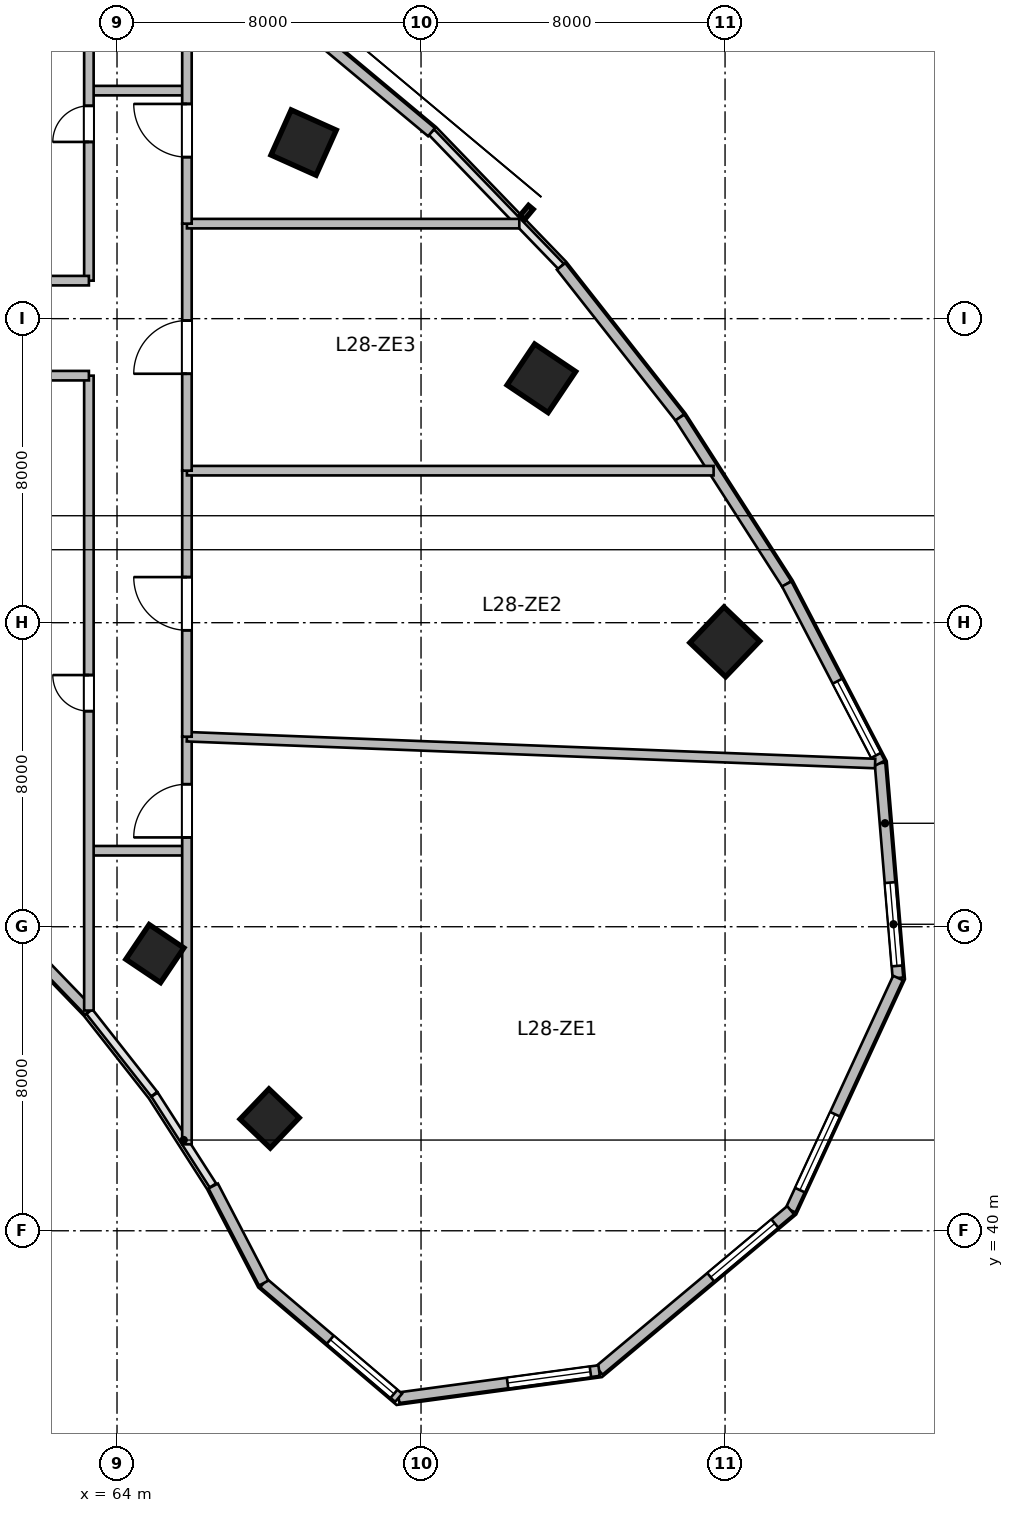
"""IFC4 building model, lengths in metres.
Left out: names, types, materials, properties, quantities, classifications, styles, units other than length and angle.
Written with IfcOpenShell. Run it as: python <this file> out.ifc"""

import sys

from ifc_helpers import new_model, si_unit, direction, frame, frame_2d, origin, origin_2d, place, context, subcontext, project, spatial, rectangle, extrude, source, transform, mapped, element, fill, save


model = new_model("IFC4")
c1 = context("Model", 3, precision=1e-05, world=origin(), true_north=direction((0.0, 1.0)))
c2 = subcontext(c1, "Body", "Model", "MODEL_VIEW")
j1 = project(units=[si_unit("LENGTHUNIT", "METRE"), si_unit("PLANEANGLEUNIT", "RADIAN")], contexts=[c1])
p1 = place(None, origin())
s1 = spatial("IfcSite", under=j1, at=p1, CompositionType="ELEMENT")
p2 = place(p1, origin())
s2 = spatial("IfcBuilding", under=s1, at=p2, CompositionType="ELEMENT")
p3 = place(p2, frame((0.0, 0.0, 119.4)))
s3 = spatial("IfcBuildingStorey", under=s2, at=p3, CompositionType="ELEMENT", Elevation=119.4)
m1 = source(origin(), c2, "Body", "SweptSolid", [
    extrude(rectangle(XDim=1.3, YDim=1.3, at=origin_2d()), origin(), (0.0, 0.0, 1.0), 3.9),
])
p4 = place(p3, frame((68.91, 68.633, 0.0), z_axis=(0.0, 0.0, 1.0), x_axis=(0.409126902895, 0.912477494148, 0.0)))
e1 = element("IfcColumn", 1, at=p4, inside=s3, PredefinedType="COLUMN", context=c2, shape_type="MappedRepresentation", body=[
    mapped(m1, transform((0.0, 0.0, 0.0), scale=1.0)),
])
m2 = source(origin(), c2, "Body", "SweptSolid", [
    extrude(rectangle(XDim=1.1, YDim=1.1, at=origin_2d()), origin(), (0.0, 0.0, 1.0), 3.9),
])
p5 = place(p3, frame((64.996, 47.294, 0.0), z_axis=(0.0, 0.0, 1.0), x_axis=(0.55774510898, 0.830012285095, 0.0)))
e2 = element("IfcColumn", 2, at=p5, inside=s3, PredefinedType="COLUMN", context=c2, shape_type="MappedRepresentation", body=[
    mapped(m2, transform((0.0, 0.0, 0.0), scale=1.0)),
])
p6 = place(p3, frame((75.167, 62.43, 0.0), z_axis=(0.0, 0.0, 1.0), x_axis=(0.55774510898, 0.830012285095, 0.0)))
e3 = element("IfcColumn", 3, at=p6, inside=s3, PredefinedType="COLUMN", context=c2, shape_type="MappedRepresentation", body=[
    mapped(m1, transform((0.0, 0.0, 0.0), scale=1.0)),
])
p7 = place(p3, frame((68.015, 42.955, 0.0), z_axis=(0.0, 0.0, 1.0), x_axis=(0.690756218984, 0.723087716626, 0.0)))
e4 = element("IfcColumn", 4, at=p7, inside=s3, PredefinedType="COLUMN", context=c2, shape_type="MappedRepresentation", body=[
    mapped(m2, transform((0.0, 0.0, 0.0), scale=1.0)),
])
p8 = place(p3, frame((79.993, 55.494, 0.0), z_axis=(0.0, 0.0, 1.0), x_axis=(0.690756218984, 0.723087716626, 0.0)))
e5 = element("IfcColumn", 5, at=p8, inside=s3, PredefinedType="COLUMN", context=c2, shape_type="MappedRepresentation", body=[
    mapped(m1, transform((0.0, 0.0, 0.0), scale=1.0)),
])
m3 = source(origin(), c2, "Body", "SweptSolid", [
    extrude(rectangle(XDim=5.674, YDim=0.28, at=frame_2d((2.837, 0.0))), origin(), (0.0, 0.0, 1.0), 3.65),
])
p9 = place(p3, frame((84.078, 52.305, 0.0), z_axis=(0.0, 0.0, 1.0), x_axis=(0.083309007867, -0.996523762491, 0.0)))
e6 = element("IfcWall", 6, at=p9, inside=s3, PredefinedType="SOLIDWALL", context=c2, shape_type="MappedRepresentation", body=[
    mapped(m3, transform((0.0, 0.0, 0.0), scale=1.0)),
])
p10 = place(p9, frame((3.155, 0.0, 0.95)))
e7 = element("IfcOpeningElement", 7, at=p10, cuts=e6, PredefinedType="OPENING", context=c2, shape_type="SweptSolid", body=[
    extrude(rectangle(XDim=2.2, YDim=2.1, at=frame_2d((1.1, 1.05))), frame((0.0, 0.15, 0.0), z_axis=(0.0, -1.0, 0.0), x_axis=(1.0, 0.0, 0.0)), (0.0, 0.0, 1.0), 0.3),
])
m4 = source(origin(), c2, "Body", "SweptSolid", [
    extrude(rectangle(XDim=6.732, YDim=0.28, at=frame_2d((3.366, 0.0))), origin(), (0.0, 0.0, 1.0), 3.65),
])
p11 = place(p3, frame((84.55, 46.652, 0.0), z_axis=(0.0, 0.0, 1.0), x_axis=(-0.419644552709, -0.907688520023, 0.0)))
e8 = element("IfcWall", 8, at=p11, inside=s3, PredefinedType="SOLIDWALL", context=c2, shape_type="MappedRepresentation", body=[
    mapped(m4, transform((0.0, 0.0, 0.0), scale=1.0)),
])
p12 = place(p11, frame((3.949, 0.0, 0.95)))
e9 = element("IfcOpeningElement", 9, at=p12, cuts=e8, PredefinedType="OPENING", context=c2, shape_type="SweptSolid", body=[
    extrude(rectangle(XDim=2.2, YDim=2.1, at=frame_2d((1.1, 1.05))), frame((0.0, 0.15, 0.0), z_axis=(0.0, -1.0, 0.0), x_axis=(1.0, 0.0, 0.0)), (0.0, 0.0, 1.0), 0.3),
])
m5 = source(origin(), c2, "Body", "SweptSolid", [
    extrude(rectangle(XDim=6.573, YDim=0.28, at=frame_2d((3.287, 0.0))), origin(), (0.0, 0.0, 1.0), 3.65),
])
p13 = place(p3, frame((81.725, 40.541, 0.0), z_axis=(0.0, 0.0, 1.0), x_axis=(-0.766715154163, -0.641987439423, 0.0)))
e10 = element("IfcWall", 10, at=p13, inside=s3, PredefinedType="SOLIDWALL", context=c2, shape_type="MappedRepresentation", body=[
    mapped(m5, transform((0.0, 0.0, 0.0), scale=1.0)),
])
p14 = place(p13, frame((0.543, 0.0, 0.95)))
e11 = element("IfcOpeningElement", 11, at=p14, cuts=e10, PredefinedType="OPENING", context=c2, shape_type="SweptSolid", body=[
    extrude(rectangle(XDim=2.2, YDim=2.1, at=frame_2d((1.1, 1.05))), frame((0.0, 0.15, 0.0), z_axis=(0.0, -1.0, 0.0), x_axis=(1.0, 0.0, 0.0)), (0.0, 0.0, 1.0), 0.3),
])
m6 = source(origin(), c2, "Body", "SweptSolid", [
    extrude(rectangle(XDim=5.324, YDim=0.28, at=frame_2d((2.662, 0.0))), origin(), (0.0, 0.0, 1.0), 3.65),
])
p15 = place(p3, frame((76.686, 36.322, 0.0), z_axis=(0.0, 0.0, 1.0), x_axis=(-0.990931467223, -0.134368252451, 0.0)))
e12 = element("IfcWall", 12, at=p15, inside=s3, PredefinedType="SOLIDWALL", context=c2, shape_type="MappedRepresentation", body=[
    mapped(m6, transform((0.0, 0.0, 0.0), scale=1.0)),
])
p16 = place(p15, frame((0.231, 0.0, 0.95)))
e13 = element("IfcOpeningElement", 13, at=p16, cuts=e12, PredefinedType="OPENING", context=c2, shape_type="SweptSolid", body=[
    extrude(rectangle(XDim=2.2, YDim=2.1, at=frame_2d((1.1, 1.05))), frame((0.0, 0.15, 0.0), z_axis=(0.0, -1.0, 0.0), x_axis=(1.0, 0.0, 0.0)), (0.0, 0.0, 1.0), 0.3),
])
m7 = source(origin(), c2, "Body", "SweptSolid", [
    extrude(rectangle(XDim=4.659, YDim=0.28, at=frame_2d((2.33, 0.0))), origin(), (0.0, 0.0, 1.0), 3.65),
])
p17 = place(p3, frame((71.41, 35.606, 0.0), z_axis=(0.0, 0.0, 1.0), x_axis=(-0.761913458795, 0.647678841176, 0.0)))
e14 = element("IfcWall", 14, at=p17, inside=s3, PredefinedType="SOLIDWALL", context=c2, shape_type="MappedRepresentation", body=[
    mapped(m7, transform((0.0, 0.0, 0.0), scale=1.0)),
])
p18 = place(p17, frame((0.16, 0.0, 0.95)))
e15 = element("IfcOpeningElement", 15, at=p18, cuts=e14, PredefinedType="OPENING", context=c2, shape_type="SweptSolid", body=[
    extrude(rectangle(XDim=2.2, YDim=2.1, at=frame_2d((1.1, 1.05))), frame((0.0, 0.15, 0.0), z_axis=(0.0, -1.0, 0.0), x_axis=(1.0, 0.0, 0.0)), (0.0, 0.0, 1.0), 0.3),
])
m8 = source(origin(), c2, "Body", "SweptSolid", [
    extrude(rectangle(XDim=2.88, YDim=0.28, at=frame_2d((1.44, 0.0))), origin(), (0.0, 0.0, 1.0), 3.65),
])
p19 = place(p3, frame((67.861, 38.624, 0.0), z_axis=(0.0, 0.0, 1.0), x_axis=(-0.461769086658, 0.887000175088, 0.0)))
e16 = element("IfcWall", 16, at=p19, inside=s3, PredefinedType="SOLIDWALL", context=c2, shape_type="MappedRepresentation", body=[
    mapped(m8, transform((0.0, 0.0, 0.0), scale=1.0)),
])
m9 = source(origin(), c2, "Body", "SweptSolid", [
    extrude(rectangle(XDim=2.68, YDim=0.28, at=frame_2d((1.34, 0.0))), origin(), (0.0, 0.0, 1.0), 3.65),
])
p20 = place(p3, frame((63.26, 45.78, 0.0), z_axis=(0.0, 0.0, 1.0), x_axis=(-0.694561996568, 0.719432855049, 0.0)))
e17 = element("IfcWall", 17, at=p20, inside=s3, PredefinedType="SOLIDWALL", context=c2, shape_type="MappedRepresentation", body=[
    mapped(m9, transform((0.0, 0.0, 0.0), scale=1.0)),
])
m10 = source(origin(), c2, "Body", "SweptSolid", [
    extrude(rectangle(XDim=4.762, YDim=0.28, at=frame_2d((2.381, 0.0))), origin(), (0.0, 0.0, 1.0), 3.65),
])
p21 = place(p3, frame((68.618, 71.958, 0.0), z_axis=(0.0, 0.0, 1.0), x_axis=(0.767952279762, -0.640507061638, 0.0)))
e18 = element("IfcWall", 18, at=p21, inside=s3, PredefinedType="SOLIDWALL", context=c2, shape_type="MappedRepresentation", body=[
    mapped(m10, transform((0.0, 0.0, 0.0), scale=1.0)),
])
m11 = source(origin(), c2, "Body", "SweptSolid", [
    extrude(rectangle(XDim=5.058, YDim=0.28, at=frame_2d((2.529, 0.0))), origin(), (0.0, 0.0, 1.0), 3.65),
])
p22 = place(p3, frame((75.685, 65.376, 0.0), z_axis=(0.0, 0.0, 1.0), x_axis=(0.618145507434, -0.786063694391, 0.0)))
e19 = element("IfcWall", 19, at=p22, inside=s3, PredefinedType="SOLIDWALL", context=c2, shape_type="MappedRepresentation", body=[
    mapped(m11, transform((0.0, 0.0, 0.0), scale=1.0)),
])
m12 = source(origin(), c2, "Body", "SweptSolid", [
    extrude(rectangle(XDim=5.205, YDim=0.28, at=frame_2d((2.603, 0.0))), origin(), (0.0, 0.0, 1.0), 3.65),
])
p23 = place(p3, frame((78.812, 61.4, 0.0), z_axis=(0.0, 0.0, 1.0), x_axis=(0.540188528895, -0.8415440293, 0.0)))
e20 = element("IfcWall", 20, at=p23, inside=s3, PredefinedType="SOLIDWALL", context=c2, shape_type="MappedRepresentation", body=[
    mapped(m12, transform((0.0, 0.0, 0.0), scale=1.0)),
])
m13 = source(origin(), c2, "Body", "SweptSolid", [
    extrude(rectangle(XDim=5.315, YDim=0.28, at=frame_2d((2.658, 0.0))), origin(), (0.0, 0.0, 1.0), 3.65),
])
p24 = place(p3, frame((81.623, 57.02, 0.0), z_axis=(0.0, 0.0, 1.0), x_axis=(0.461760527822, -0.887004630735, 0.0)))
e21 = element("IfcWall", 21, at=p24, inside=s3, PredefinedType="SOLIDWALL", context=c2, shape_type="MappedRepresentation", body=[
    mapped(m13, transform((0.0, 0.0, 0.0), scale=1.0)),
])
p25 = place(p24, frame((2.886, 0.0, 0.95)))
e22 = element("IfcOpeningElement", 22, at=p25, cuts=e21, PredefinedType="OPENING", context=c2, shape_type="SweptSolid", body=[
    extrude(rectangle(XDim=2.2, YDim=2.1, at=frame_2d((1.1, 1.05))), frame((0.0, 0.15, 0.0), z_axis=(0.0, -1.0, 0.0), x_axis=(1.0, 0.0, 0.0)), (0.0, 0.0, 1.0), 0.3),
])
m14 = source(origin(), c2, "Body", "SweptSolid", [
    extrude(rectangle(XDim=2.5, YDim=0.25, at=frame_2d((1.25, 0.0))), origin(), (0.0, 0.0, 1.0), 3.65),
])
for number, where, z_axis, x_axis in (
    (23, (63.3, 50.0, 0.0), (0.0, 0.0, 1.0), (1.0, 0.0, 0.0)),
    (24, (63.3, 70.0, 0.0), (0.0, 0.0, 1.0), (1.0, 0.0, 0.0)),
):
    element("IfcWall", number, at=place(p3, frame(where, z_axis=z_axis, x_axis=x_axis)), inside=s3, PredefinedType="PARTITIONING", context=c2, shape_type="MappedRepresentation", body=[
        mapped(m14, transform((0.0, 0.0, 0.0), scale=1.0)),
    ])
m15 = source(origin(), c2, "Body", "SweptSolid", [
    extrude(rectangle(XDim=10.726, YDim=0.25, at=frame_2d((5.363, 0.0))), origin(), (0.0, 0.0, 1.0), 2.942),
])
p26 = place(p3, frame((65.84, 42.274, 0.0), z_axis=(0.0, 0.0, 1.0), x_axis=(0.0, 1.0, 0.0)))
e25 = element("IfcWall", 25, at=p26, inside=s3, PredefinedType="PARTITIONING", context=c2, shape_type="MappedRepresentation", body=[
    mapped(m15, transform((0.0, 0.0, 0.0), scale=1.0)),
])
p27 = place(p26, frame((8.076, 0.0, 0.0)))
e26 = element("IfcOpeningElement", 26, at=p27, cuts=e25, PredefinedType="OPENING", context=c2, shape_type="SweptSolid", body=[
    extrude(rectangle(XDim=1.4, YDim=2.15, at=frame_2d((0.7, 1.075))), frame((0.0, 0.135, 0.0), z_axis=(0.0, -1.0, 0.0), x_axis=(1.0, 0.0, 0.0)), (0.0, 0.0, 1.0), 0.27),
])
m16 = source(origin(), c2, "Body", "SweptSolid", [
    extrude(rectangle(XDim=18.122, YDim=0.25, at=frame_2d((9.061, 0.0))), origin(), (0.0, 0.0, 1.0), 3.65),
])
p28 = place(p3, frame((65.84, 53.0, 0.0), z_axis=(0.0, 0.0, 1.0), x_axis=(0.999241241773, -0.038947923447, 0.0)))
e27 = element("IfcWall", 27, at=p28, inside=s3, PredefinedType="PARTITIONING", context=c2, shape_type="MappedRepresentation", body=[
    mapped(m16, transform((0.0, 0.0, 0.0), scale=1.0)),
])
m17 = source(origin(), c2, "Body", "SweptSolid", [
    extrude(rectangle(XDim=7.0, YDim=0.25, at=frame_2d((3.5, 0.0))), origin(), (0.0, 0.0, 1.0), 3.093),
])
p29 = place(p3, frame((65.84, 53.0, 0.0), z_axis=(0.0, 0.0, 1.0), x_axis=(0.0, 1.0, 0.0)))
e28 = element("IfcWall", 28, at=p29, inside=s3, PredefinedType="PARTITIONING", context=c2, shape_type="MappedRepresentation", body=[
    mapped(m17, transform((0.0, 0.0, 0.0), scale=1.0)),
])
p30 = place(p29, frame((2.8, 0.0, 0.0)))
e29 = element("IfcOpeningElement", 29, at=p30, cuts=e28, PredefinedType="OPENING", context=c2, shape_type="SweptSolid", body=[
    extrude(rectangle(XDim=1.4, YDim=2.15, at=frame_2d((0.7, 1.075))), frame((0.0, 0.135, 0.0), z_axis=(0.0, -1.0, 0.0), x_axis=(1.0, 0.0, 0.0)), (0.0, 0.0, 1.0), 0.27),
])
m18 = source(origin(), c2, "Body", "SweptSolid", [
    extrude(rectangle(XDim=13.858, YDim=0.25, at=frame_2d((6.929, 0.0))), origin(), (0.0, 0.0, 1.0), 3.65),
])
p31 = place(p3, frame((65.84, 60.0, 0.0), z_axis=(0.0, 0.0, 1.0), x_axis=(1.0, 0.0, 0.0)))
e30 = element("IfcWall", 30, at=p31, inside=s3, PredefinedType="PARTITIONING", context=c2, shape_type="MappedRepresentation", body=[
    mapped(m18, transform((0.0, 0.0, 0.0), scale=1.0)),
])
m19 = source(origin(), c2, "Body", "SweptSolid", [
    extrude(rectangle(XDim=6.5, YDim=0.25, at=frame_2d((3.25, 0.0))), origin(), (0.0, 0.0, 1.0), 2.942),
])
p32 = place(p3, frame((65.84, 60.0, 0.0), z_axis=(0.0, 0.0, 1.0), x_axis=(0.0, 1.0, 0.0)))
e31 = element("IfcWall", 31, at=p32, inside=s3, PredefinedType="PARTITIONING", context=c2, shape_type="MappedRepresentation", body=[
    mapped(m19, transform((0.0, 0.0, 0.0), scale=1.0)),
])
p33 = place(p32, frame((2.55, 0.0, 0.0)))
e32 = element("IfcOpeningElement", 32, at=p33, cuts=e31, PredefinedType="OPENING", context=c2, shape_type="SweptSolid", body=[
    extrude(rectangle(XDim=1.4, YDim=2.15, at=frame_2d((0.7, 1.075))), frame((0.0, 0.135, 0.0), z_axis=(0.0, -1.0, 0.0), x_axis=(1.0, 0.0, 0.0)), (0.0, 0.0, 1.0), 0.27),
])
m20 = source(origin(), c2, "Body", "SweptSolid", [
    extrude(rectangle(XDim=8.746, YDim=0.25, at=frame_2d((4.373, 0.0))), origin(), (0.0, 0.0, 1.0), 3.65),
])
p34 = place(p3, frame((65.84, 66.5, 0.0), z_axis=(0.0, 0.0, 1.0), x_axis=(1.0, 0.0, 0.0)))
e33 = element("IfcWall", 33, at=p34, inside=s3, PredefinedType="PARTITIONING", context=c2, shape_type="MappedRepresentation", body=[
    mapped(m20, transform((0.0, 0.0, 0.0), scale=1.0)),
])
m21 = source(origin(), c2, "Body", "SweptSolid", [
    extrude(rectangle(XDim=7.27, YDim=0.25, at=frame_2d((3.635, 0.0))), origin(), (0.0, 0.0, 1.0), 3.65),
])
p35 = place(p3, frame((65.84, 66.5, 0.0), z_axis=(0.0, 0.0, 1.0), x_axis=(0.0, 1.0, 0.0)))
e34 = element("IfcWall", 34, at=p35, inside=s3, PredefinedType="PARTITIONING", context=c2, shape_type="MappedRepresentation", body=[
    mapped(m21, transform((0.0, 0.0, 0.0), scale=1.0)),
])
p36 = place(p35, frame((1.75, 0.0, 0.0)))
e35 = element("IfcOpeningElement", 35, at=p36, cuts=e34, PredefinedType="OPENING", context=c2, shape_type="SweptSolid", body=[
    extrude(rectangle(XDim=1.4, YDim=2.15, at=frame_2d((0.7, 1.075))), frame((0.0, 0.135, 0.0), z_axis=(0.0, -1.0, 0.0), x_axis=(1.0, 0.0, 0.0)), (0.0, 0.0, 1.0), 0.27),
])
m22 = source(origin(), c2, "Body", "SweptSolid", [
    extrude(rectangle(XDim=16.706, YDim=0.25, at=frame_2d((8.353, 0.0))), origin(), (0.0, 0.0, 1.0), 2.942),
])
p37 = place(p3, frame((63.26, 45.794, 0.0), z_axis=(0.0, 0.0, 1.0), x_axis=(0.0, 1.0, 0.0)))
e36 = element("IfcWall", 36, at=p37, inside=s3, PredefinedType="PARTITIONING", context=c2, shape_type="MappedRepresentation", body=[
    mapped(m22, transform((0.0, 0.0, 0.0), scale=1.0)),
])
p38 = place(p37, frame((7.878, 0.0, 0.0)))
e37 = element("IfcOpeningElement", 37, at=p38, cuts=e36, PredefinedType="OPENING", context=c2, shape_type="SweptSolid", body=[
    extrude(rectangle(XDim=0.95, YDim=2.1, at=frame_2d((0.475, 1.05))), frame((0.0, 0.135, 0.0), z_axis=(0.0, -1.0, 0.0), x_axis=(1.0, 0.0, 0.0)), (0.0, 0.0, 1.0), 0.27),
])
m23 = source(origin(), c2, "Body", "SweptSolid", [
    extrude(rectangle(XDim=3.76, YDim=0.25, at=frame_2d((1.88, 0.0))), origin(), (0.0, 0.0, 1.0), 3.65),
])
p39 = place(p3, frame((59.5, 62.5, 0.0), z_axis=(0.0, 0.0, 1.0), x_axis=(1.0, 0.0, 0.0)))
e38 = element("IfcWall", 38, at=p39, inside=s3, PredefinedType="PARTITIONING", context=c2, shape_type="MappedRepresentation", body=[
    mapped(m23, transform((0.0, 0.0, 0.0), scale=1.0)),
])
m24 = source(origin(), c2, "Body", "SweptSolid", [
    extrude(rectangle(XDim=10.224, YDim=0.25, at=frame_2d((5.112, 0.0))), origin(), (0.0, 0.0, 1.0), 3.65),
])
p40 = place(p3, frame((63.26, 65.0, 0.0), z_axis=(0.0, 0.0, 1.0), x_axis=(0.0, 1.0, 0.0)))
e39 = element("IfcWall", 39, at=p40, inside=s3, PredefinedType="PARTITIONING", context=c2, shape_type="MappedRepresentation", body=[
    mapped(m24, transform((0.0, 0.0, 0.0), scale=1.0)),
])
p41 = place(p40, frame((3.65, 0.0, 0.0)))
e40 = element("IfcOpeningElement", 40, at=p41, cuts=e39, PredefinedType="OPENING", context=c2, shape_type="SweptSolid", body=[
    extrude(rectangle(XDim=0.95, YDim=2.1, at=frame_2d((0.475, 1.05))), frame((0.0, 0.135, 0.0), z_axis=(0.0, -1.0, 0.0), x_axis=(1.0, 0.0, 0.0)), (0.0, 0.0, 1.0), 0.27),
])
m25 = source(origin(), c2, "Body", "SweptSolid", [
    extrude(rectangle(XDim=1.66, YDim=0.25, at=frame_2d((0.83, 0.0))), origin(), (0.0, 0.0, 1.0), 3.65),
])
p42 = place(p3, frame((61.6, 65.0, 0.0), z_axis=(0.0, 0.0, 1.0), x_axis=(1.0, 0.0, 0.0)))
e41 = element("IfcWall", 41, at=p42, inside=s3, PredefinedType="PARTITIONING", context=c2, shape_type="MappedRepresentation", body=[
    mapped(m25, transform((0.0, 0.0, 0.0), scale=1.0)),
])
m26 = source(origin(), c2, "Body", "SweptSolid", [
    extrude(rectangle(XDim=2.2, YDim=2.1, at=frame_2d((1.1, 1.05))), frame((0.0, 0.03, 0.0), z_axis=(0.0, -1.0, 0.0), x_axis=(1.0, 0.0, 0.0)), (0.0, 0.0, 1.0), 0.06),
])
p43 = place(p10, origin())
e42 = element("IfcWindow", 42, at=p43, inside=s3, PartitioningType="TRIPLE_PANEL_VERTICAL", PredefinedType="WINDOW", context=c2, shape_type="MappedRepresentation", body=[
    mapped(m26, transform((0.0, 0.0, 0.0), scale=1.0)),
])
fill(e7, e42)
p44 = place(p12, origin())
e43 = element("IfcWindow", 43, at=p44, inside=s3, PartitioningType="TRIPLE_PANEL_VERTICAL", PredefinedType="WINDOW", context=c2, shape_type="MappedRepresentation", body=[
    mapped(m26, transform((0.0, 0.0, 0.0), scale=1.0)),
])
fill(e9, e43)
p45 = place(p14, origin())
e44 = element("IfcWindow", 44, at=p45, inside=s3, PartitioningType="TRIPLE_PANEL_VERTICAL", PredefinedType="WINDOW", context=c2, shape_type="MappedRepresentation", body=[
    mapped(m26, transform((0.0, 0.0, 0.0), scale=1.0)),
])
fill(e11, e44)
p46 = place(p16, origin())
e45 = element("IfcWindow", 45, at=p46, inside=s3, PartitioningType="TRIPLE_PANEL_VERTICAL", PredefinedType="WINDOW", context=c2, shape_type="MappedRepresentation", body=[
    mapped(m26, transform((0.0, 0.0, 0.0), scale=1.0)),
])
fill(e13, e45)
p47 = place(p18, origin())
e46 = element("IfcWindow", 46, at=p47, inside=s3, PartitioningType="TRIPLE_PANEL_VERTICAL", PredefinedType="WINDOW", context=c2, shape_type="MappedRepresentation", body=[
    mapped(m26, transform((0.0, 0.0, 0.0), scale=1.0)),
])
fill(e15, e46)
p48 = place(p25, origin())
e47 = element("IfcWindow", 47, at=p48, inside=s3, PartitioningType="TRIPLE_PANEL_VERTICAL", PredefinedType="WINDOW", context=c2, shape_type="MappedRepresentation", body=[
    mapped(m26, transform((0.0, 0.0, 0.0), scale=1.0)),
])
fill(e22, e47)
m27 = source(origin(), c2, "Body", "SweptSolid", [
    extrude(rectangle(XDim=1.4, YDim=2.15, at=frame_2d((0.7, 1.075))), frame((0.0, 0.025, 0.0), z_axis=(0.0, -1.0, 0.0), x_axis=(1.0, 0.0, 0.0)), (0.0, 0.0, 1.0), 0.05),
])
p49 = place(p27, origin())
e48 = element("IfcDoor", 48, at=p49, inside=s3, OperationType="SINGLE_SWING_LEFT", PredefinedType="DOOR", context=c2, shape_type="MappedRepresentation", body=[
    mapped(m27, transform((0.0, 0.0, 0.0), scale=1.0)),
])
fill(e26, e48)
p50 = place(p30, origin())
e49 = element("IfcDoor", 49, at=p50, inside=s3, OperationType="SINGLE_SWING_RIGHT", PredefinedType="DOOR", context=c2, shape_type="MappedRepresentation", body=[
    mapped(m27, transform((0.0, 0.0, 0.0), scale=1.0)),
])
fill(e29, e49)
p51 = place(p33, origin())
e50 = element("IfcDoor", 50, at=p51, inside=s3, OperationType="SINGLE_SWING_LEFT", PredefinedType="DOOR", context=c2, shape_type="MappedRepresentation", body=[
    mapped(m27, transform((0.0, 0.0, 0.0), scale=1.0)),
])
fill(e32, e50)
p52 = place(p36, origin())
e51 = element("IfcDoor", 51, at=p52, inside=s3, OperationType="SINGLE_SWING_RIGHT", PredefinedType="DOOR", context=c2, shape_type="MappedRepresentation", body=[
    mapped(m27, transform((0.0, 0.0, 0.0), scale=1.0)),
])
fill(e35, e51)
m28 = source(origin(), c2, "Body", "SweptSolid", [
    extrude(rectangle(XDim=0.95, YDim=2.1, at=frame_2d((0.475, 1.05))), frame((0.0, 0.025, 0.0), z_axis=(0.0, -1.0, 0.0), x_axis=(1.0, 0.0, 0.0)), (0.0, 0.0, 1.0), 0.05),
])
p53 = place(p38, origin())
e52 = element("IfcDoor", 52, at=p53, inside=s3, OperationType="SINGLE_SWING_RIGHT", PredefinedType="DOOR", context=c2, shape_type="MappedRepresentation", body=[
    mapped(m28, transform((0.0, 0.0, 0.0), scale=1.0)),
])
fill(e37, e52)
p54 = place(p41, origin())
e53 = element("IfcDoor", 53, at=p54, inside=s3, OperationType="SINGLE_SWING_LEFT", PredefinedType="DOOR", context=c2, shape_type="MappedRepresentation", body=[
    mapped(m28, transform((0.0, 0.0, 0.0), scale=1.0)),
])
fill(e40, e53)
save(model, sys.argv[1])
